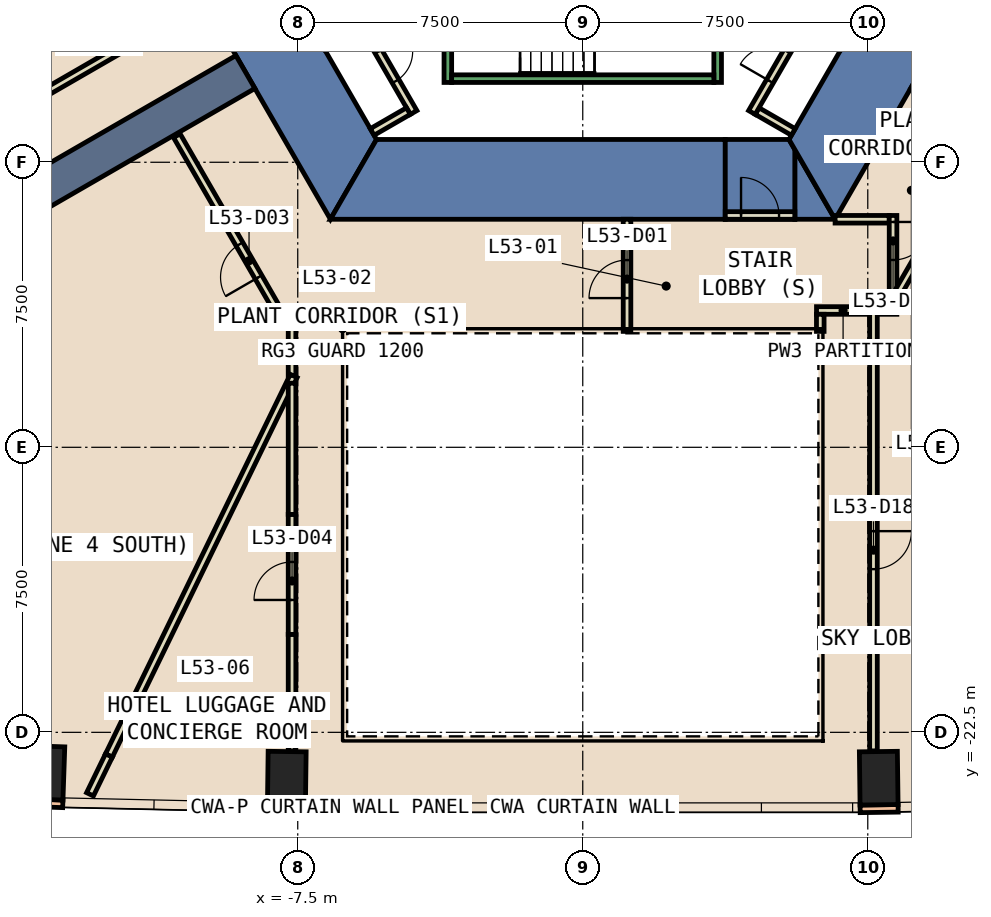
"""IFC4 building model, lengths in metres.
Left out: names, types, materials, properties, quantities, classifications, styles, units other than length and angle.
Written with IfcOpenShell. Run it as: python <this file> out.ifc"""

import sys

from ifc_helpers import new_model, si_unit, direction, frame, frame_2d, origin, origin_2d, place, context, subcontext, project, spatial, polyline, rectangle, outline, extrude, element, fill, save


model = new_model("IFC4")
c1 = context("Model", 3, precision=1e-05, world=origin(), true_north=direction((0.0, 1.0)))
c2 = subcontext(c1, "Body", "Model", "MODEL_VIEW")
j1 = project(units=[si_unit("LENGTHUNIT", "METRE"), si_unit("PLANEANGLEUNIT", "RADIAN")], contexts=[c1])
p1 = place(None, origin())
s1 = spatial("IfcSite", under=j1, at=p1, CompositionType="ELEMENT")
p2 = place(p1, origin())
s2 = spatial("IfcBuilding", under=s1, at=p2, CompositionType="ELEMENT")
p3 = place(p2, frame((0.0, 0.0, 236.0)))
s3 = spatial("IfcBuildingStorey", under=s2, at=p3, CompositionType="ELEMENT", Elevation=236.0)
for number, where, z_axis, x_axis in (
    (1, (-14.154, -23.565, -0.6), (0.0, 0.0, 1.0), (-0.999, 0.034, 0.0)),
    (2, (-7.788, -23.706, -0.6), (0.0, 0.0, 1.0), (-1.0, 0.013, 0.0)),
    (3, (7.788, -23.706, -0.6), (0.0, 0.0, 1.0), (1.0, 0.013, 0.0)),
):
    element("IfcColumn", number, at=place(p3, frame(where, z_axis=z_axis, x_axis=x_axis)), inside=s3, PredefinedType="COLUMN", context=c2, shape_type="SweptSolid", body=[
        extrude(rectangle(XDim=1.0, YDim=1.4, at=origin_2d()), origin(), (0.0, 0.0, 1.0), 5.4),
    ])
p4 = place(p3, frame((0.0, 0.0, -0.6)))
e4 = element("IfcWall", 4, at=p4, inside=s3, PredefinedType="SHEAR", context=c2, shape_type="SweptSolid", body=[
    extrude(outline(polyline([(-13.279, 2.5), (-6.64, -9.0), (-5.427, -6.9), (-10.854, 2.5), (-13.279, 2.5)])), origin(), (0.0, 0.0, 1.0), 5.4),
])
p5 = place(p3, frame((0.0, 0.0, -0.6)))
e5 = element("IfcWall", 5, at=p5, inside=s3, PredefinedType="SHEAR", context=c2, shape_type="SweptSolid", body=[
    extrude(outline(polyline([(3.75, -9.0), (3.75, -6.9), (-5.427, -6.9), (-6.64, -9.0), (3.75, -9.0)])), origin(), (0.0, 0.0, 1.0), 5.4),
])
p6 = place(p3, frame((0.0, 0.0, -0.6)))
e6 = element("IfcWall", 6, at=p6, inside=s3, PredefinedType="SHEAR", context=c2, shape_type="SweptSolid", body=[
    extrude(outline(polyline([(5.58, -7.165), (5.58, -9.0), (6.64, -9.0), (5.58, -7.165)])), origin(), (0.0, 0.0, 1.0), 5.4),
])
p7 = place(p3, frame((0.0, 0.0, 3.6)))
e7 = element("IfcWall", 7, at=p7, inside=s3, PredefinedType="SHEAR", context=c2, shape_type="SweptSolid", body=[
    extrude(outline(polyline([(5.58, -9.0), (5.58, -7.165), (5.427, -6.9), (3.75, -6.9), (3.75, -9.0), (5.58, -9.0)])), origin(), (0.0, 0.0, 1.0), 1.2),
])
p8 = place(p3, frame((0.0, 0.0, -0.6)))
e8 = element("IfcWall", 8, at=p8, inside=s3, PredefinedType="SHEAR", context=c2, shape_type="SweptSolid", body=[
    extrude(outline(polyline([(6.64, -9.0), (13.279, 2.5), (10.854, 2.5), (5.427, -6.9), (6.64, -9.0)])), origin(), (0.0, 0.0, 1.0), 5.4),
])
for number, where, z_axis, x_axis in (
    (9, (8.877, -5.125, 0.0), (0.0, 0.0, 1.0), (0.866, -0.5, 0.0)),
    (10, (-8.877, -5.125, 0.0), (0.0, 0.0, 1.0), (-0.866, -0.5, 0.0)),
):
    element("IfcWall", number, at=place(p3, frame(where, z_axis=z_axis, x_axis=x_axis)), inside=s3, PredefinedType="SHEAR", context=c2, shape_type="SweptSolid", body=[
        extrude(rectangle(XDim=23.232, YDim=1.0, at=frame_2d((11.616, 0.0))), origin(), (0.0, 0.0, 1.0), 4.8),
    ])
p9 = place(p3, frame((-14.681, -24.347, 0.0), z_axis=(0.0, 0.0, 1.0), x_axis=(0.999415245245, -0.034193092457, 0.0)))
e11 = element("IfcWall", 11, at=p9, inside=s3, PredefinedType="STANDARD", context=c2, shape_type="SweptSolid", body=[
    extrude(rectangle(XDim=1.0, YDim=0.2, at=frame_2d((0.5, 0.0))), origin(), (0.0, 0.0, 1.0), 4.8),
])
for number, where, z_axis, x_axis in (
    (12, (-8.299, -24.499, 0.0), (0.0, 0.0, 1.0), (1.0, -0.014, 0.0)),
    (13, (7.299, -24.513, 0.0), (0.0, 0.0, 1.0), (1.0, 0.014, 0.0)),
):
    element("IfcWall", number, at=place(p3, frame(where, z_axis=z_axis, x_axis=x_axis)), inside=s3, PredefinedType="STANDARD", context=c2, shape_type="SweptSolid", body=[
        extrude(rectangle(XDim=1.0, YDim=0.2, at=frame_2d((0.5, 0.0))), origin(), (0.0, 0.0, 1.0), 4.8),
    ])
p10 = place(p3, frame((5.541, -6.703, 0.0), z_axis=(0.0, 0.0, 1.0), x_axis=(-0.86621513555, 0.499671230855, 0.0)))
e14 = element("IfcWall", 14, at=p10, inside=s3, PredefinedType="PARTITIONING", context=c2, shape_type="SweptSolid", body=[
    extrude(rectangle(XDim=1.1, YDim=0.2, at=frame_2d((0.55, 0.0))), origin(), (0.0, 0.0, 1.0), 4.8),
])
p11 = place(p3, frame((4.451, -6.19, 0.0), z_axis=(0.0, 0.0, 1.0), x_axis=(0.500011755427, 0.866018616679, 0.0)))
e15 = element("IfcWall", 15, at=p11, inside=s3, PredefinedType="PARTITIONING", context=c2, shape_type="SweptSolid", body=[
    extrude(rectangle(XDim=2.8, YDim=0.2, at=frame_2d((1.4, 0.0))), origin(), (0.0, 0.0, 1.0), 4.8),
])
p12 = place(p11, frame((0.95, 0.0, 0.0)))
e16 = element("IfcOpeningElement", 16, at=p12, cuts=e15, PredefinedType="OPENING", context=c2, shape_type="SweptSolid", body=[
    extrude(rectangle(XDim=0.9, YDim=2.1, at=frame_2d((0.45, 1.05))), frame((0.0, 0.11, 0.0), z_axis=(0.0, -1.0, 0.0), x_axis=(1.0, 0.0, 0.0)), (0.0, 0.0, 1.0), 0.22),
])
p13 = place(p3, frame((-5.851, -3.765, 0.0), z_axis=(0.0, 0.0, 1.0), x_axis=(0.500011755427, -0.866018616679, 0.0)))
e17 = element("IfcWall", 17, at=p13, inside=s3, PredefinedType="PARTITIONING", context=c2, shape_type="SweptSolid", body=[
    extrude(rectangle(XDim=2.8, YDim=0.2, at=frame_2d((1.4, 0.0))), origin(), (0.0, 0.0, 1.0), 4.8),
])
p14 = place(p13, frame((0.95, 0.0, 0.0)))
e18 = element("IfcOpeningElement", 18, at=p14, cuts=e17, PredefinedType="OPENING", context=c2, shape_type="SweptSolid", body=[
    extrude(rectangle(XDim=0.9, YDim=2.1, at=frame_2d((0.45, 1.05))), frame((0.0, 0.11, 0.0), z_axis=(0.0, -1.0, 0.0), x_axis=(1.0, 0.0, 0.0)), (0.0, 0.0, 1.0), 0.22),
])
p15 = place(p3, frame((-4.588, -6.153, 0.0), z_axis=(0.0, 0.0, 1.0), x_axis=(-0.86621513555, -0.499671230855, 0.0)))
e19 = element("IfcWall", 19, at=p15, inside=s3, PredefinedType="PARTITIONING", context=c2, shape_type="SweptSolid", body=[
    extrude(rectangle(XDim=1.1, YDim=0.2, at=frame_2d((0.55, 0.0))), origin(), (0.0, 0.0, 1.0), 4.8),
])
p16 = place(p3, frame((1.165, -11.95, 0.0), z_axis=(0.0, 0.0, 1.0), x_axis=(0.0, 1.0, 0.0)))
e20 = element("IfcWall", 20, at=p16, inside=s3, PredefinedType="PARTITIONING", context=c2, shape_type="SweptSolid", body=[
    extrude(rectangle(XDim=2.95, YDim=0.2, at=frame_2d((1.475, 0.0))), origin(), (0.0, 0.0, 1.0), 4.8),
])
p17 = place(p16, frame((0.876, 0.0, 0.0)))
e21 = element("IfcOpeningElement", 21, at=p17, cuts=e20, PredefinedType="OPENING", context=c2, shape_type="SweptSolid", body=[
    extrude(rectangle(XDim=1.0, YDim=2.1, at=frame_2d((0.5, 1.05))), frame((0.0, 0.11, 0.0), z_axis=(0.0, -1.0, 0.0), x_axis=(1.0, 0.0, 0.0)), (0.0, 0.0, 1.0), 0.22),
])
p18 = place(p3, frame((7.55, -11.4, 0.0), z_axis=(0.0, 0.0, 1.0), x_axis=(-1.0, 0.0, 0.0)))
e22 = element("IfcWall", 22, at=p18, inside=s3, PredefinedType="PARTITIONING", context=c2, shape_type="SweptSolid", body=[
    extrude(rectangle(XDim=1.399, YDim=0.2, at=frame_2d((0.7, 0.0))), origin(), (0.0, 0.0, 1.0), 4.8),
])
p19 = place(p3, frame((6.25, -11.5, 0.0), z_axis=(0.0, 0.0, 1.0), x_axis=(0.0, -1.0, 0.0)))
e23 = element("IfcWall", 23, at=p19, inside=s3, PredefinedType="PARTITIONING", context=c2, shape_type="SweptSolid", body=[
    extrude(rectangle(XDim=0.45, YDim=0.2, at=frame_2d((0.225, 0.0))), origin(), (0.0, 0.0, 1.0), 4.8),
])
p20 = place(p3, frame((6.64, -9.0, 0.0), z_axis=(0.0, 0.0, 1.0), x_axis=(1.0, 0.0, 0.0)))
e24 = element("IfcWall", 24, at=p20, inside=s3, PredefinedType="PARTITIONING", context=c2, shape_type="SweptSolid", body=[
    extrude(rectangle(XDim=1.425, YDim=0.2, at=frame_2d((0.712, 0.0))), origin(), (0.0, 0.0, 1.0), 4.8),
])
p21 = place(p3, frame((8.165, -8.9, 0.0), z_axis=(0.0, 0.0, 1.0), x_axis=(0.0, -1.0, 0.0)))
e25 = element("IfcWall", 25, at=p21, inside=s3, PredefinedType="PARTITIONING", context=c2, shape_type="SweptSolid", body=[
    extrude(rectangle(XDim=2.359, YDim=0.2, at=frame_2d((1.18, 0.0))), origin(), (0.0, 0.0, 1.0), 4.8),
])
p22 = place(p21, frame((0.171, 0.0, 0.0)))
e26 = element("IfcOpeningElement", 26, at=p22, cuts=e25, PredefinedType="OPENING", context=c2, shape_type="SweptSolid", body=[
    extrude(rectangle(XDim=1.0, YDim=2.1, at=frame_2d((0.5, 1.05))), frame((0.0, 0.11, 0.0), z_axis=(0.0, -1.0, 0.0), x_axis=(1.0, 0.0, 0.0)), (0.0, 0.0, 1.0), 0.22),
])
p23 = place(p3, frame((8.265, -11.4, 0.0), z_axis=(0.0, 0.0, 1.0), x_axis=(-1.0, 0.0, 0.0)))
e27 = element("IfcWall", 27, at=p23, inside=s3, PredefinedType="PARTITIONING", context=c2, shape_type="SweptSolid", body=[
    extrude(rectangle(XDim=0.515, YDim=0.2, at=frame_2d((0.257, 0.0))), origin(), (0.0, 0.0, 1.0), 4.8),
])
p24 = place(p3, frame((7.65, -11.3, 0.0), z_axis=(0.0, 0.0, 1.0), x_axis=(0.0, -1.0, 0.0)))
e28 = element("IfcWall", 28, at=p24, inside=s3, PredefinedType="PARTITIONING", context=c2, shape_type="SweptSolid", body=[
    extrude(rectangle(XDim=5.465, YDim=0.2, at=frame_2d((2.732, 0.0))), origin(), (0.0, 0.0, 1.0), 4.8),
])
p25 = place(p3, frame((-7.65, -13.113, 0.0), z_axis=(0.0, 0.0, 1.0), x_axis=(0.0, 1.0, 0.0)))
e29 = element("IfcWall", 29, at=p25, inside=s3, PredefinedType="PARTITIONING", context=c2, shape_type="SweptSolid", body=[
    extrude(rectangle(XDim=1.813, YDim=0.2, at=frame_2d((0.906, 0.0))), origin(), (0.0, 0.0, 1.0), 4.8),
])
p26 = place(p3, frame((-7.976, -11.487, 0.0), z_axis=(0.0, 0.0, 1.0), x_axis=(-0.499909942208, 0.866077392432, 0.0)))
e30 = element("IfcWall", 30, at=p26, inside=s3, PredefinedType="PARTITIONING", context=c2, shape_type="SweptSolid", body=[
    extrude(rectangle(XDim=5.411, YDim=0.2, at=frame_2d((2.705, 0.0))), origin(), (0.0, 0.0, 1.0), 4.8),
])
p27 = place(p26, frame((1.111, 0.0, 0.0)))
e31 = element("IfcOpeningElement", 31, at=p27, cuts=e30, PredefinedType="OPENING", context=c2, shape_type="SweptSolid", body=[
    extrude(rectangle(XDim=1.0, YDim=2.1, at=frame_2d((0.5, 1.05))), frame((0.0, 0.11, 0.0), z_axis=(0.0, -1.0, 0.0), x_axis=(1.0, 0.0, 0.0)), (0.0, 0.0, 1.0), 0.22),
])
p28 = place(p3, frame((-7.65, -22.988, 0.0), z_axis=(0.0, 0.0, 1.0), x_axis=(0.0, 1.0, 0.0)))
e32 = element("IfcWall", 32, at=p28, inside=s3, PredefinedType="PARTITIONING", context=c2, shape_type="SweptSolid", body=[
    extrude(rectangle(XDim=3.066, YDim=0.2, at=frame_2d((1.533, 0.0))), origin(), (0.0, 0.0, 1.0), 4.8),
])
p29 = place(p3, frame((8.98, -9.747, 0.0), z_axis=(0.0, 0.0, 1.0), x_axis=(-0.499908274205, -0.866078355221, 0.0)))
e33 = element("IfcWall", 33, at=p29, inside=s3, PredefinedType="PARTITIONING", context=c2, shape_type="SweptSolid", body=[
    extrude(rectangle(XDim=1.63, YDim=0.2, at=frame_2d((0.815, 0.0))), origin(), (0.0, 0.0, 1.0), 4.8),
])
p30 = place(p3, frame((-7.606, -13.123, 0.0), z_axis=(0.0, 0.0, 1.0), x_axis=(-0.437790876822, -0.899076831073, 0.0)))
e34 = element("IfcWall", 34, at=p30, inside=s3, PredefinedType="PARTITIONING", context=c2, shape_type="SweptSolid", body=[
    extrude(rectangle(XDim=11.108, YDim=0.2, at=frame_2d((5.554, 0.0))), origin(), (0.0, 0.0, 1.0), 4.8),
])
p31 = place(p3, frame((-13.51, -1.9, 0.0), z_axis=(0.0, 0.0, 1.0), x_axis=(-0.950838276897, -0.309687860897, 0.0)))
e35 = element("IfcWall", 35, at=p31, inside=s3, PredefinedType="PARTITIONING", context=c2, shape_type="SweptSolid", body=[
    extrude(rectangle(XDim=16.336, YDim=0.2, at=frame_2d((8.168, 0.0))), origin(), (0.0, 0.0, 1.0), 2.4),
])
p32 = place(p3, frame((3.75, -8.9, 0.0), z_axis=(0.0, 0.0, 1.0), x_axis=(1.0, 0.0, 0.0)))
e36 = element("IfcWall", 36, at=p32, inside=s3, PredefinedType="PARTITIONING", context=c2, shape_type="SweptSolid", body=[
    extrude(rectangle(XDim=1.83, YDim=0.2, at=frame_2d((0.915, 0.0))), origin(), (0.0, 0.0, 1.0), 2.4),
])
p33 = place(p32, frame((0.415, 0.0, 0.0)))
e37 = element("IfcOpeningElement", 37, at=p33, cuts=e36, PredefinedType="OPENING", context=c2, shape_type="SweptSolid", body=[
    extrude(rectangle(XDim=1.0, YDim=2.1, at=frame_2d((0.5, 1.05))), frame((0.0, 0.11, 0.0), z_axis=(0.0, -1.0, 0.0), x_axis=(1.0, 0.0, 0.0)), (0.0, 0.0, 1.0), 0.22),
])
p34 = place(p3, frame((7.65, -16.765, 0.0), z_axis=(0.0, 0.0, 1.0), x_axis=(0.0, -1.0, 0.0)))
e38 = element("IfcWall", 38, at=p34, inside=s3, PredefinedType="PARTITIONING", context=c2, shape_type="SweptSolid", body=[
    extrude(rectangle(XDim=3.157, YDim=0.2, at=frame_2d((1.579, 0.0))), origin(), (0.0, 0.0, 1.0), 2.4),
])
p35 = place(p34, frame((0.441, 0.0, 0.0)))
e39 = element("IfcOpeningElement", 39, at=p35, cuts=e38, PredefinedType="OPENING", context=c2, shape_type="SweptSolid", body=[
    extrude(rectangle(XDim=1.0, YDim=2.1, at=frame_2d((0.5, 1.05))), frame((0.0, 0.11, 0.0), z_axis=(0.0, -1.0, 0.0), x_axis=(1.0, 0.0, 0.0)), (0.0, 0.0, 1.0), 0.22),
])
p36 = place(p3, frame((7.65, -19.922, 0.0), z_axis=(0.0, 0.0, 1.0), x_axis=(0.0, -1.0, 0.0)))
e40 = element("IfcWall", 40, at=p36, inside=s3, PredefinedType="PARTITIONING", context=c2, shape_type="SweptSolid", body=[
    extrude(rectangle(XDim=3.066, YDim=0.2, at=frame_2d((1.533, 0.0))), origin(), (0.0, 0.0, 1.0), 4.8),
])
p37 = place(p3, frame((-7.65, -19.922, 0.0), z_axis=(0.0, 0.0, 1.0), x_axis=(0.0, 1.0, 0.0)))
e41 = element("IfcWall", 41, at=p37, inside=s3, PredefinedType="PARTITIONING", context=c2, shape_type="SweptSolid", body=[
    extrude(rectangle(XDim=3.157, YDim=0.2, at=frame_2d((1.579, 0.0))), origin(), (0.0, 0.0, 1.0), 2.4),
])
p38 = place(p37, frame((0.905, 0.0, 0.0)))
e42 = element("IfcOpeningElement", 42, at=p38, cuts=e41, PredefinedType="OPENING", context=c2, shape_type="SweptSolid", body=[
    extrude(rectangle(XDim=1.0, YDim=2.1, at=frame_2d((0.5, 1.05))), frame((0.0, 0.11, 0.0), z_axis=(0.0, -1.0, 0.0), x_axis=(1.0, 0.0, 0.0)), (0.0, 0.0, 1.0), 0.22),
])
p39 = place(p3, frame((-7.65, -16.765, 0.0), z_axis=(0.0, 0.0, 1.0), x_axis=(0.0, 1.0, 0.0)))
e43 = element("IfcWall", 43, at=p39, inside=s3, PredefinedType="PARTITIONING", context=c2, shape_type="SweptSolid", body=[
    extrude(rectangle(XDim=3.452, YDim=0.2, at=frame_2d((1.726, 0.0))), origin(), (0.0, 0.0, 1.0), 4.8),
])
p40 = place(p3, frame((-12.469, -23.11, 0.0), z_axis=(0.0, 0.0, 1.0), x_axis=(-0.437728823941, -0.899107044067, 0.0)))
e44 = element("IfcWall", 44, at=p40, inside=s3, PredefinedType="PARTITIONING", context=c2, shape_type="SweptSolid", body=[
    extrude(rectangle(XDim=1.135, YDim=0.2, at=frame_2d((0.568, 0.0))), origin(), (0.0, 0.0, 1.0), 2.4),
])
p41 = place(p3, frame((-30.173, -14.92, 0.0), z_axis=(0.0, 0.0, 1.0), x_axis=(0.866038403425, 0.499977483287, 0.0)))
e45 = element("IfcWall", 45, at=p41, inside=s3, PredefinedType="PARTITIONING", context=c2, shape_type="SweptSolid", body=[
    extrude(rectangle(XDim=23.341, YDim=0.2, at=frame_2d((11.67, 0.0))), origin(), (0.0, 0.0, 1.0), 4.8),
])
p42 = place(p3, frame((-3.55, -1.0, 0.0), z_axis=(0.0, 0.0, 1.0), x_axis=(0.0, -1.0, 0.0)))
e46 = element("IfcWall", 46, at=p42, inside=s3, PredefinedType="STANDARD", context=c2, shape_type="SweptSolid", body=[
    extrude(rectangle(XDim=4.4, YDim=0.2, at=frame_2d((2.2, 0.0))), origin(), (0.0, 0.0, 1.0), 4.8),
])
p43 = place(p42, frame((2.4, 0.0, 0.0)))
e47 = element("IfcOpeningElement", 47, at=p43, cuts=e46, PredefinedType="OPENING", context=c2, shape_type="SweptSolid", body=[
    extrude(rectangle(XDim=1.1, YDim=2.2, at=frame_2d((0.55, 1.1))), frame((0.0, 0.11, 0.0), z_axis=(0.0, -1.0, 0.0), x_axis=(1.0, 0.0, 0.0)), (0.0, 0.0, 1.0), 0.22),
])
p44 = place(p3, frame((3.55, -2.667, 0.0), z_axis=(0.0, 0.0, 1.0), x_axis=(0.0, -1.0, 0.0)))
e48 = element("IfcWall", 48, at=p44, inside=s3, PredefinedType="STANDARD", context=c2, shape_type="SweptSolid", body=[
    extrude(rectangle(XDim=2.733, YDim=0.2, at=frame_2d((1.366, 0.0))), origin(), (0.0, 0.0, 1.0), 4.8),
])
p45 = place(p3, frame((-3.45, -5.3, 0.0), z_axis=(0.0, 0.0, 1.0), x_axis=(1.0, 0.0, 0.0)))
e49 = element("IfcWall", 49, at=p45, inside=s3, PredefinedType="STANDARD", context=c2, shape_type="SweptSolid", body=[
    extrude(rectangle(XDim=6.9, YDim=0.2, at=frame_2d((3.45, 0.0))), origin(), (0.0, 0.0, 1.0), 4.8),
])
p46 = place(p17, origin())
e50 = element("IfcDoor", 50, at=p46, inside=s3, OperationType="SINGLE_SWING_LEFT", PredefinedType="DOOR", context=c2, shape_type="SweptSolid", body=[
    extrude(rectangle(XDim=1.0, YDim=2.1, at=frame_2d((0.5, 1.05))), frame((0.0, 0.025, 0.0), z_axis=(0.0, -1.0, 0.0), x_axis=(1.0, 0.0, 0.0)), (0.0, 0.0, 1.0), 0.05),
])
fill(e21, e50)
p47 = place(p22, origin())
e51 = element("IfcDoor", 51, at=p47, inside=s3, OperationType="SINGLE_SWING_RIGHT", PredefinedType="DOOR", context=c2, shape_type="SweptSolid", body=[
    extrude(rectangle(XDim=1.0, YDim=2.1, at=frame_2d((0.5, 1.05))), frame((0.0, 0.025, 0.0), z_axis=(0.0, -1.0, 0.0), x_axis=(1.0, 0.0, 0.0)), (0.0, 0.0, 1.0), 0.05),
])
fill(e26, e51)
p48 = place(p27, origin())
e52 = element("IfcDoor", 52, at=p48, inside=s3, OperationType="SINGLE_SWING_LEFT", PredefinedType="DOOR", context=c2, shape_type="SweptSolid", body=[
    extrude(rectangle(XDim=1.0, YDim=2.1, at=frame_2d((0.5, 1.05))), frame((0.0, 0.025, 0.0), z_axis=(0.0, -1.0, 0.0), x_axis=(1.0, 0.0, 0.0)), (0.0, 0.0, 1.0), 0.05),
])
fill(e31, e52)
p49 = place(p38, origin())
e53 = element("IfcDoor", 53, at=p49, inside=s3, OperationType="SINGLE_SWING_RIGHT", PredefinedType="DOOR", context=c2, shape_type="SweptSolid", body=[
    extrude(rectangle(XDim=1.0, YDim=2.1, at=frame_2d((0.5, 1.05))), frame((0.0, 0.025, 0.0), z_axis=(0.0, -1.0, 0.0), x_axis=(1.0, 0.0, 0.0)), (0.0, 0.0, 1.0), 0.05),
])
fill(e42, e53)
p50 = place(p35, origin())
e54 = element("IfcDoor", 54, at=p50, inside=s3, OperationType="SINGLE_SWING_RIGHT", PredefinedType="DOOR", context=c2, shape_type="SweptSolid", body=[
    extrude(rectangle(XDim=1.0, YDim=2.1, at=frame_2d((0.5, 1.05))), frame((0.0, 0.025, 0.0), z_axis=(0.0, -1.0, 0.0), x_axis=(1.0, 0.0, 0.0)), (0.0, 0.0, 1.0), 0.05),
])
fill(e39, e54)
p51 = place(p12, origin())
e55 = element("IfcDoor", 55, at=p51, inside=s3, OperationType="SINGLE_SWING_LEFT", PredefinedType="DOOR", context=c2, shape_type="SweptSolid", body=[
    extrude(rectangle(XDim=0.9, YDim=2.1, at=frame_2d((0.45, 1.05))), frame((0.0, 0.025, 0.0), z_axis=(0.0, -1.0, 0.0), x_axis=(1.0, 0.0, 0.0)), (0.0, 0.0, 1.0), 0.05),
])
fill(e16, e55)
p52 = place(p14, origin())
e56 = element("IfcDoor", 56, at=p52, inside=s3, OperationType="SINGLE_SWING_RIGHT", PredefinedType="DOOR", context=c2, shape_type="SweptSolid", body=[
    extrude(rectangle(XDim=0.9, YDim=2.1, at=frame_2d((0.45, 1.05))), frame((0.0, 0.025, 0.0), z_axis=(0.0, -1.0, 0.0), x_axis=(1.0, 0.0, 0.0)), (0.0, 0.0, 1.0), 0.05),
])
fill(e18, e56)
p53 = place(p33, origin())
e57 = element("IfcDoor", 57, at=p53, inside=s3, OperationType="SINGLE_SWING_LEFT", PredefinedType="DOOR", context=c2, shape_type="SweptSolid", body=[
    extrude(rectangle(XDim=1.0, YDim=2.1, at=frame_2d((0.5, 1.05))), frame((0.0, 0.025, 0.0), z_axis=(0.0, -1.0, 0.0), x_axis=(1.0, 0.0, 0.0)), (0.0, 0.0, 1.0), 0.05),
])
fill(e37, e57)
save(model, sys.argv[1])
